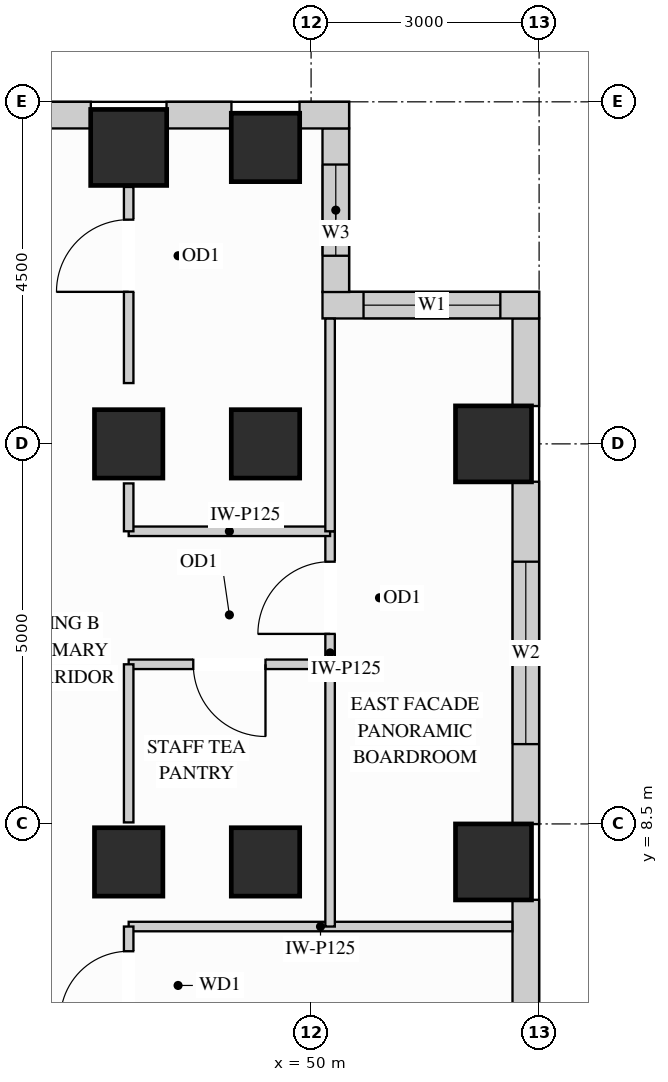
"""IFC4 building model, lengths in metres.
Left out: names, types, materials, properties, quantities, classifications, styles, units other than length and angle.
Written with IfcOpenShell. Run it as: python <this file> out.ifc"""

import sys

from ifc_helpers import new_model, si_unit, direction, frame, frame_2d, origin, origin_2d, place, context, subcontext, project, spatial, rectangle, extrude, source, transform, mapped, element, fill, save


model = new_model("IFC4")
c1 = context("Model", 3, precision=1e-05, world=origin(), true_north=direction((0.0, 1.0)))
c2 = subcontext(c1, "Body", "Model", "MODEL_VIEW")
j1 = project(units=[si_unit("LENGTHUNIT", "METRE"), si_unit("PLANEANGLEUNIT", "RADIAN")], contexts=[c1])
p1 = place(None, origin())
s1 = spatial("IfcSite", under=j1, at=p1, CompositionType="ELEMENT")
p2 = place(p1, origin())
s2 = spatial("IfcBuilding", under=s1, at=p2, CompositionType="ELEMENT")
p3 = place(p2, frame((0.0, 0.0, 161.1)))
s3 = spatial("IfcBuildingStorey", under=s2, at=p3, CompositionType="ELEMENT", Elevation=161.1)
m1 = source(origin(), c2, "Body", "SweptSolid", [
    extrude(rectangle(XDim=0.9, YDim=0.9, at=origin_2d()), origin(), (0.0, 0.0, 1.0), 3.4),
])
for number, where, z_axis, x_axis in (
    (1, (47.6, 13.5, 0.0), (0.0, 0.0, 1.0), (1.0, 0.0, 0.0)),
    (2, (47.6, 8.0, 0.0), (0.0, 0.0, 1.0), (1.0, 0.0, 0.0)),
    (3, (49.4, 13.5, 0.0), (0.0, 0.0, 1.0), (1.0, 0.0, 0.0)),
    (4, (49.4, 17.4, 0.0), (0.0, 0.0, 1.0), (1.0, 0.0, 0.0)),
    (5, (49.4, 8.0, 0.0), (0.0, 0.0, 1.0), (1.0, 0.0, 0.0)),
):
    element("IfcColumn", number, at=place(p3, frame(where, z_axis=z_axis, x_axis=x_axis)), inside=s3, PredefinedType="COLUMN", context=c2, shape_type="MappedRepresentation", body=[
        mapped(m1, transform((0.0, 0.0, 0.0), x_axis=(1.0, 0.0, 0.0), y_axis=(0.0, 1.0, 0.0), z_axis=(0.0, 0.0, 1.0))),
    ])
m2 = source(origin(), c2, "Body", "SweptSolid", [
    extrude(rectangle(XDim=1.0, YDim=1.0, at=origin_2d()), origin(), (0.0, 0.0, 1.0), 3.4),
])
for number, where, z_axis, x_axis in (
    (6, (47.6, 17.4, 0.0), (0.0, 0.0, 1.0), (1.0, 0.0, 0.0)),
    (7, (52.4, 13.5, 0.0), (0.0, 0.0, 1.0), (1.0, 0.0, 0.0)),
    (8, (52.4, 8.0, 0.0), (0.0, 0.0, 1.0), (1.0, 0.0, 0.0)),
):
    element("IfcColumn", number, at=place(p3, frame(where, z_axis=z_axis, x_axis=x_axis)), inside=s3, PredefinedType="COLUMN", context=c2, shape_type="MappedRepresentation", body=[
        mapped(m2, transform((0.0, 0.0, 0.0), x_axis=(1.0, 0.0, 0.0), y_axis=(0.0, 1.0, 0.0), z_axis=(0.0, 0.0, 1.0))),
    ])
m3 = source(origin(), c2, "Body", "SweptSolid", [
    extrude(rectangle(XDim=3.504, YDim=0.35, at=frame_2d((1.752, 0.0))), origin(), (0.0, 0.0, 1.0), 2.612),
])
p4 = place(p3, frame((52.825, 3.998, 0.0), z_axis=(0.0, 0.0, 1.0), x_axis=(0.0, 1.0, 0.0)))
e9 = element("IfcWall", 9, at=p4, inside=s3, PredefinedType="SOLIDWALL", context=c2, shape_type="MappedRepresentation", body=[
    mapped(m3, transform((0.0, 0.0, 0.0), x_axis=(1.0, 0.0, 0.0), y_axis=(0.0, 1.0, 0.0), z_axis=(0.0, 0.0, 1.0))),
])
p5 = place(p3, frame((52.825, 8.498, 0.0), z_axis=(0.0, 0.0, 1.0), x_axis=(0.0, 1.0, 0.0)))
e10 = element("IfcWall", 10, at=p5, inside=s3, PredefinedType="SOLIDWALL", context=c2, shape_type="SweptSolid", body=[
    extrude(rectangle(XDim=4.504, YDim=0.35, at=frame_2d((2.252, 0.0))), origin(), (0.0, 0.0, 1.0), 2.612),
])
p6 = place(p5, frame((1.052, 0.0, 0.78)))
e11 = element("IfcOpeningElement", 11, at=p6, cuts=e10, PredefinedType="OPENING", context=c2, shape_type="SweptSolid", body=[
    extrude(rectangle(XDim=2.4, YDim=1.652, at=frame_2d((1.2, 0.826))), frame((0.0, 0.185, 0.0), z_axis=(0.0, -1.0, 0.0), x_axis=(1.0, 0.0, 0.0)), (0.0, 0.0, 1.0), 0.37),
])
m4 = source(origin(), c2, "Body", "SweptSolid", [
    extrude(rectangle(XDim=1.154, YDim=0.35, at=frame_2d((0.577, 0.0))), origin(), (0.0, 0.0, 1.0), 3.385),
])
p7 = place(p3, frame((52.825, 13.998, 0.0), z_axis=(0.0, 0.0, 1.0), x_axis=(0.0, 1.0, 0.0)))
e12 = element("IfcWall", 12, at=p7, inside=s3, PredefinedType="SOLIDWALL", context=c2, shape_type="MappedRepresentation", body=[
    mapped(m4, transform((0.0, 0.0, 0.0), x_axis=(1.0, 0.0, 0.0), y_axis=(0.0, 1.0, 0.0), z_axis=(0.0, 0.0, 1.0))),
])
p8 = place(p3, frame((53.0, 15.325, 0.0), z_axis=(0.0, 0.0, 1.0), x_axis=(-1.0, 0.0, 0.0)))
e13 = element("IfcWall", 13, at=p8, inside=s3, PredefinedType="SOLIDWALL", context=c2, shape_type="SweptSolid", body=[
    extrude(rectangle(XDim=2.85, YDim=0.35, at=frame_2d((1.425, 0.0))), origin(), (0.0, 0.0, 1.0), 3.385),
])
p9 = place(p8, frame((0.51, 0.0, 0.78)))
e14 = element("IfcOpeningElement", 14, at=p9, cuts=e13, PredefinedType="OPENING", context=c2, shape_type="SweptSolid", body=[
    extrude(rectangle(XDim=1.8, YDim=2.1, at=frame_2d((0.9, 1.05))), frame((0.0, 0.185, 0.0), z_axis=(0.0, -1.0, 0.0), x_axis=(1.0, 0.0, 0.0)), (0.0, 0.0, 1.0), 0.37),
])
p10 = place(p3, frame((50.325, 15.498, 0.0), z_axis=(0.0, 0.0, 1.0), x_axis=(0.0, 1.0, 0.0)))
e15 = element("IfcWall", 15, at=p10, inside=s3, PredefinedType="SOLIDWALL", context=c2, shape_type="SweptSolid", body=[
    extrude(rectangle(XDim=2.154, YDim=0.35, at=frame_2d((1.077, 0.0))), origin(), (0.0, 0.0, 1.0), 3.385),
])
p11 = place(p10, frame((0.477, 0.0, 0.78)))
e16 = element("IfcOpeningElement", 16, at=p11, cuts=e15, PredefinedType="OPENING", context=c2, shape_type="SweptSolid", body=[
    extrude(rectangle(XDim=1.2, YDim=2.1, at=frame_2d((0.6, 1.05))), frame((0.0, 0.185, 0.0), z_axis=(0.0, -1.0, 0.0), x_axis=(1.0, 0.0, 0.0)), (0.0, 0.0, 1.0), 0.37),
])
m5 = source(origin(), c2, "Body", "SweptSolid", [
    extrude(rectangle(XDim=0.652, YDim=0.35, at=frame_2d((0.326, 0.0))), origin(), (0.0, 0.0, 1.0), 3.385),
])
p12 = place(p3, frame((50.5, 17.825, 0.0), z_axis=(0.0, 0.0, 1.0), x_axis=(-1.0, 0.0, 0.0)))
e17 = element("IfcWall", 17, at=p12, inside=s3, PredefinedType="SOLIDWALL", context=c2, shape_type="MappedRepresentation", body=[
    mapped(m5, transform((0.0, 0.0, 0.0), x_axis=(1.0, 0.0, 0.0), y_axis=(0.0, 1.0, 0.0), z_axis=(0.0, 0.0, 1.0))),
])
m6 = source(origin(), c2, "Body", "SweptSolid", [
    extrude(rectangle(XDim=0.854, YDim=0.35, at=frame_2d((0.427, 0.0))), origin(), (0.0, 0.0, 1.0), 3.385),
])
p13 = place(p3, frame((48.952, 17.825, 0.0), z_axis=(0.0, 0.0, 1.0), x_axis=(-1.0, 0.0, 0.0)))
e18 = element("IfcWall", 18, at=p13, inside=s3, PredefinedType="SOLIDWALL", context=c2, shape_type="MappedRepresentation", body=[
    mapped(m6, transform((0.0, 0.0, 0.0), x_axis=(1.0, 0.0, 0.0), y_axis=(0.0, 1.0, 0.0), z_axis=(0.0, 0.0, 1.0))),
])
p14 = place(p3, frame((47.102, 17.825, 0.0), z_axis=(0.0, 0.0, 1.0), x_axis=(-1.0, 0.0, 0.0)))
e19 = element("IfcWall", 19, at=p14, inside=s3, PredefinedType="SOLIDWALL", context=c2, shape_type="SweptSolid", body=[
    extrude(rectangle(XDim=6.604, YDim=0.35, at=frame_2d((3.302, 0.0))), origin(), (0.0, 0.0, 1.0), 2.612),
])
p15 = place(p14, frame((1.849, 0.0, 0.78)))
e20 = element("IfcOpeningElement", 20, at=p15, cuts=e19, PredefinedType="OPENING", context=c2, shape_type="SweptSolid", body=[
    extrude(rectangle(XDim=1.8, YDim=1.652, at=frame_2d((0.9, 0.826))), frame((0.0, 0.185, 0.0), z_axis=(0.0, -1.0, 0.0), x_axis=(1.0, 0.0, 0.0)), (0.0, 0.0, 1.0), 0.37),
])
p16 = place(p14, frame((4.067, 0.0, 0.78)))
e21 = element("IfcOpeningElement", 21, at=p16, cuts=e19, PredefinedType="OPENING", context=c2, shape_type="SweptSolid", body=[
    extrude(rectangle(XDim=1.8, YDim=1.652, at=frame_2d((0.9, 0.826))), frame((0.0, 0.185, 0.0), z_axis=(0.0, -1.0, 0.0), x_axis=(1.0, 0.0, 0.0)), (0.0, 0.0, 1.0), 0.37),
])
p17 = place(p3, frame((50.25, 10.6, 0.0), z_axis=(0.0, 0.0, 1.0), x_axis=(0.0, 1.0, 0.0)))
e22 = element("IfcWall", 22, at=p17, inside=s3, PredefinedType="PARTITIONING", context=c2, shape_type="SweptSolid", body=[
    extrude(rectangle(XDim=1.75, YDim=0.125, at=frame_2d((0.875, 0.0))), origin(), (0.0, 0.0, 1.0), 3.385),
])
p18 = place(p17, frame((0.4, 0.0, 0.0)))
e23 = element("IfcOpeningElement", 23, at=p18, cuts=e22, PredefinedType="OPENING", context=c2, shape_type="SweptSolid", body=[
    extrude(rectangle(XDim=0.95, YDim=2.15, at=frame_2d((0.475, 1.075))), frame((0.0, 0.073, 0.0), z_axis=(0.0, -1.0, 0.0), x_axis=(1.0, 0.0, 0.0)), (0.0, 0.0, 1.0), 0.145),
])
m7 = source(origin(), c2, "Body", "SweptSolid", [
    extrude(rectangle(XDim=5.048, YDim=0.125, at=frame_2d((2.524, 0.0))), origin(), (0.0, 0.0, 1.0), 3.385),
])
p19 = place(p3, frame((47.6, 7.15, 0.0), z_axis=(0.0, 0.0, 1.0), x_axis=(1.0, 0.0, 0.0)))
e24 = element("IfcWall", 24, at=p19, inside=s3, PredefinedType="PARTITIONING", context=c2, shape_type="MappedRepresentation", body=[
    mapped(m7, transform((0.0, 0.0, 0.0), x_axis=(1.0, 0.0, 0.0), y_axis=(0.0, 1.0, 0.0), z_axis=(0.0, 0.0, 1.0))),
])
m8 = source(origin(), c2, "Body", "SweptSolid", [
    extrude(rectangle(XDim=2.65, YDim=0.125, at=frame_2d((1.325, 0.0))), origin(), (0.0, 0.0, 1.0), 3.385),
])
p20 = place(p3, frame((47.6, 12.35, 0.0), z_axis=(0.0, 0.0, 1.0), x_axis=(1.0, 0.0, 0.0)))
e25 = element("IfcWall", 25, at=p20, inside=s3, PredefinedType="PARTITIONING", context=c2, shape_type="MappedRepresentation", body=[
    mapped(m8, transform((0.0, 0.0, 0.0), x_axis=(1.0, 0.0, 0.0), y_axis=(0.0, 1.0, 0.0), z_axis=(0.0, 0.0, 1.0))),
])
p21 = place(p3, frame((47.6, 10.6, 0.0), z_axis=(0.0, 0.0, 1.0), x_axis=(1.0, 0.0, 0.0)))
e26 = element("IfcWall", 26, at=p21, inside=s3, PredefinedType="PARTITIONING", context=c2, shape_type="SweptSolid", body=[
    extrude(rectangle(XDim=2.65, YDim=0.125, at=frame_2d((1.325, 0.0))), origin(), (0.0, 0.0, 1.0), 2.773),
])
p22 = place(p21, frame((0.85, 0.0, 0.0)))
e27 = element("IfcOpeningElement", 27, at=p22, cuts=e26, PredefinedType="OPENING", context=c2, shape_type="SweptSolid", body=[
    extrude(rectangle(XDim=0.95, YDim=2.15, at=frame_2d((0.475, 1.075))), frame((0.0, 0.073, 0.0), z_axis=(0.0, -1.0, 0.0), x_axis=(1.0, 0.0, 0.0)), (0.0, 0.0, 1.0), 0.145),
])
m9 = source(origin(), c2, "Body", "SweptSolid", [
    extrude(rectangle(XDim=3.45, YDim=0.125, at=frame_2d((1.725, 0.0))), origin(), (0.0, 0.0, 1.0), 3.385),
])
p23 = place(p3, frame((50.25, 7.15, 0.0), z_axis=(0.0, 0.0, 1.0), x_axis=(0.0, 1.0, 0.0)))
e28 = element("IfcWall", 28, at=p23, inside=s3, PredefinedType="PARTITIONING", context=c2, shape_type="MappedRepresentation", body=[
    mapped(m9, transform((0.0, 0.0, 0.0), x_axis=(1.0, 0.0, 0.0), y_axis=(0.0, 1.0, 0.0), z_axis=(0.0, 0.0, 1.0))),
])
m10 = source(origin(), c2, "Body", "SweptSolid", [
    extrude(rectangle(XDim=2.798, YDim=0.125, at=frame_2d((1.399, 0.0))), origin(), (0.0, 0.0, 1.0), 3.385),
])
p24 = place(p3, frame((50.25, 12.35, 0.0), z_axis=(0.0, 0.0, 1.0), x_axis=(0.0, 1.0, 0.0)))
e29 = element("IfcWall", 29, at=p24, inside=s3, PredefinedType="PARTITIONING", context=c2, shape_type="MappedRepresentation", body=[
    mapped(m10, transform((0.0, 0.0, 0.0), x_axis=(1.0, 0.0, 0.0), y_axis=(0.0, 1.0, 0.0), z_axis=(0.0, 0.0, 1.0))),
])
m11 = source(origin(), c2, "Body", "SweptSolid", [
    extrude(rectangle(XDim=2.08, YDim=0.125, at=frame_2d((1.04, 0.0))), origin(), (0.0, 0.0, 1.0), 2.773),
])
p25 = place(p3, frame((47.6, 8.52, 0.0), z_axis=(0.0, 0.0, 1.0), x_axis=(0.0, 1.0, 0.0)))
e30 = element("IfcWall", 30, at=p25, inside=s3, PredefinedType="PARTITIONING", context=c2, shape_type="MappedRepresentation", body=[
    mapped(m11, transform((0.0, 0.0, 0.0), x_axis=(1.0, 0.0, 0.0), y_axis=(0.0, 1.0, 0.0), z_axis=(0.0, 0.0, 1.0))),
])
p26 = place(p3, frame((47.6, 14.3, 0.0), z_axis=(0.0, 0.0, 1.0), x_axis=(0.0, 1.0, 0.0)))
e31 = element("IfcWall", 31, at=p26, inside=s3, PredefinedType="PARTITIONING", context=c2, shape_type="SweptSolid", body=[
    extrude(rectangle(XDim=2.58, YDim=0.125, at=frame_2d((1.29, 0.0))), origin(), (0.0, 0.0, 1.0), 2.773),
])
p27 = place(p26, frame((1.2, 0.0, 0.0)))
e32 = element("IfcOpeningElement", 32, at=p27, cuts=e31, PredefinedType="OPENING", context=c2, shape_type="SweptSolid", body=[
    extrude(rectangle(XDim=0.95, YDim=2.15, at=frame_2d((0.475, 1.075))), frame((0.0, 0.073, 0.0), z_axis=(0.0, -1.0, 0.0), x_axis=(1.0, 0.0, 0.0)), (0.0, 0.0, 1.0), 0.145),
])
m12 = source(origin(), c2, "Body", "SweptSolid", [
    extrude(rectangle(XDim=0.63, YDim=0.125, at=frame_2d((0.315, 0.0))), origin(), (0.0, 0.0, 1.0), 2.773),
])
p28 = place(p3, frame((47.6, 12.35, 0.0), z_axis=(0.0, 0.0, 1.0), x_axis=(0.0, 1.0, 0.0)))
e33 = element("IfcWall", 33, at=p28, inside=s3, PredefinedType="PARTITIONING", context=c2, shape_type="MappedRepresentation", body=[
    mapped(m12, transform((0.0, 0.0, 0.0), x_axis=(1.0, 0.0, 0.0), y_axis=(0.0, 1.0, 0.0), z_axis=(0.0, 0.0, 1.0))),
])
p29 = place(p3, frame((47.6, 5.65, 0.0), z_axis=(0.0, 0.0, 1.0), x_axis=(0.0, 1.0, 0.0)))
e34 = element("IfcWall", 34, at=p29, inside=s3, PredefinedType="PARTITIONING", context=c2, shape_type="SweptSolid", body=[
    extrude(rectangle(XDim=1.5, YDim=0.125, at=frame_2d((0.75, 0.0))), origin(), (0.0, 0.0, 1.0), 2.773),
])
p30 = place(p29, frame((0.275, 0.0, 0.0)))
e35 = element("IfcOpeningElement", 35, at=p30, cuts=e34, PredefinedType="OPENING", context=c2, shape_type="SweptSolid", body=[
    extrude(rectangle(XDim=0.9, YDim=2.15, at=frame_2d((0.45, 1.075))), frame((0.0, 0.073, 0.0), z_axis=(0.0, -1.0, 0.0), x_axis=(1.0, 0.0, 0.0)), (0.0, 0.0, 1.0), 0.145),
])
m13 = source(origin(), c2, "Body", "SweptSolid", [
    extrude(rectangle(XDim=0.95, YDim=2.15, at=frame_2d((0.475, 1.075))), frame((0.0, 0.025, 0.0), z_axis=(0.0, -1.0, 0.0), x_axis=(1.0, 0.0, 0.0)), (0.0, 0.0, 1.0), 0.05),
])
p31 = place(p22, origin())
e36 = element("IfcDoor", 36, at=p31, inside=s3, OperationType="SINGLE_SWING_RIGHT", PredefinedType="DOOR", context=c2, shape_type="MappedRepresentation", body=[
    mapped(m13, transform((0.0, 0.0, 0.0), x_axis=(1.0, 0.0, 0.0), y_axis=(0.0, 1.0, 0.0), z_axis=(0.0, 0.0, 1.0))),
])
fill(e27, e36)
p32 = place(p18, origin())
e37 = element("IfcDoor", 37, at=p32, inside=s3, OperationType="SINGLE_SWING_LEFT", PredefinedType="DOOR", context=c2, shape_type="MappedRepresentation", body=[
    mapped(m13, transform((0.0, 0.0, 0.0), x_axis=(1.0, 0.0, 0.0), y_axis=(0.0, 1.0, 0.0), z_axis=(0.0, 0.0, 1.0))),
])
fill(e23, e37)
p33 = place(p27, origin())
e38 = element("IfcDoor", 38, at=p33, inside=s3, OperationType="SINGLE_SWING_LEFT", PredefinedType="DOOR", context=c2, shape_type="MappedRepresentation", body=[
    mapped(m13, transform((0.0, 0.0, 0.0), x_axis=(1.0, 0.0, 0.0), y_axis=(0.0, 1.0, 0.0), z_axis=(0.0, 0.0, 1.0))),
])
fill(e32, e38)
m14 = source(origin(), c2, "Body", "SweptSolid", [
    extrude(rectangle(XDim=0.9, YDim=2.15, at=frame_2d((0.45, 1.075))), frame((0.0, 0.025, 0.0), z_axis=(0.0, -1.0, 0.0), x_axis=(1.0, 0.0, 0.0)), (0.0, 0.0, 1.0), 0.05),
])
p34 = place(p30, origin())
e39 = element("IfcDoor", 39, at=p34, inside=s3, OperationType="SINGLE_SWING_LEFT", PredefinedType="DOOR", context=c2, shape_type="MappedRepresentation", body=[
    mapped(m14, transform((0.0, 0.0, 0.0), x_axis=(1.0, 0.0, 0.0), y_axis=(0.0, 1.0, 0.0), z_axis=(0.0, 0.0, 1.0))),
])
fill(e35, e39)
m15 = source(origin(), c2, "Body", "SweptSolid", [
    extrude(rectangle(XDim=1.8, YDim=2.1, at=frame_2d((0.9, 1.05))), frame((0.0, 0.03, 0.0), z_axis=(0.0, -1.0, 0.0), x_axis=(1.0, 0.0, 0.0)), (0.0, 0.0, 1.0), 0.06),
])
p35 = place(p9, origin())
e40 = element("IfcWindow", 40, at=p35, inside=s3, PartitioningType="SINGLE_PANEL", PredefinedType="WINDOW", context=c2, shape_type="MappedRepresentation", body=[
    mapped(m15, transform((0.0, 0.0, 0.0), x_axis=(1.0, 0.0, 0.0), y_axis=(0.0, 1.0, 0.0), z_axis=(0.0, 0.0, 1.0))),
])
fill(e14, e40)
m16 = source(origin(), c2, "Body", "SweptSolid", [
    extrude(rectangle(XDim=2.4, YDim=1.652, at=frame_2d((1.2, 0.826))), frame((0.0, 0.03, 0.0), z_axis=(0.0, -1.0, 0.0), x_axis=(1.0, 0.0, 0.0)), (0.0, 0.0, 1.0), 0.06),
])
p36 = place(p6, origin())
e41 = element("IfcWindow", 41, at=p36, inside=s3, PartitioningType="SINGLE_PANEL", PredefinedType="WINDOW", context=c2, shape_type="MappedRepresentation", body=[
    mapped(m16, transform((0.0, 0.0, 0.0), x_axis=(1.0, 0.0, 0.0), y_axis=(0.0, 1.0, 0.0), z_axis=(0.0, 0.0, 1.0))),
])
fill(e11, e41)
m17 = source(origin(), c2, "Body", "SweptSolid", [
    extrude(rectangle(XDim=1.2, YDim=2.1, at=frame_2d((0.6, 1.05))), frame((0.0, 0.03, 0.0), z_axis=(0.0, -1.0, 0.0), x_axis=(1.0, 0.0, 0.0)), (0.0, 0.0, 1.0), 0.06),
])
p37 = place(p11, origin())
e42 = element("IfcWindow", 42, at=p37, inside=s3, PartitioningType="SINGLE_PANEL", PredefinedType="WINDOW", context=c2, shape_type="MappedRepresentation", body=[
    mapped(m17, transform((0.0, 0.0, 0.0), x_axis=(1.0, 0.0, 0.0), y_axis=(0.0, 1.0, 0.0), z_axis=(0.0, 0.0, 1.0))),
])
fill(e16, e42)
save(model, sys.argv[1])
